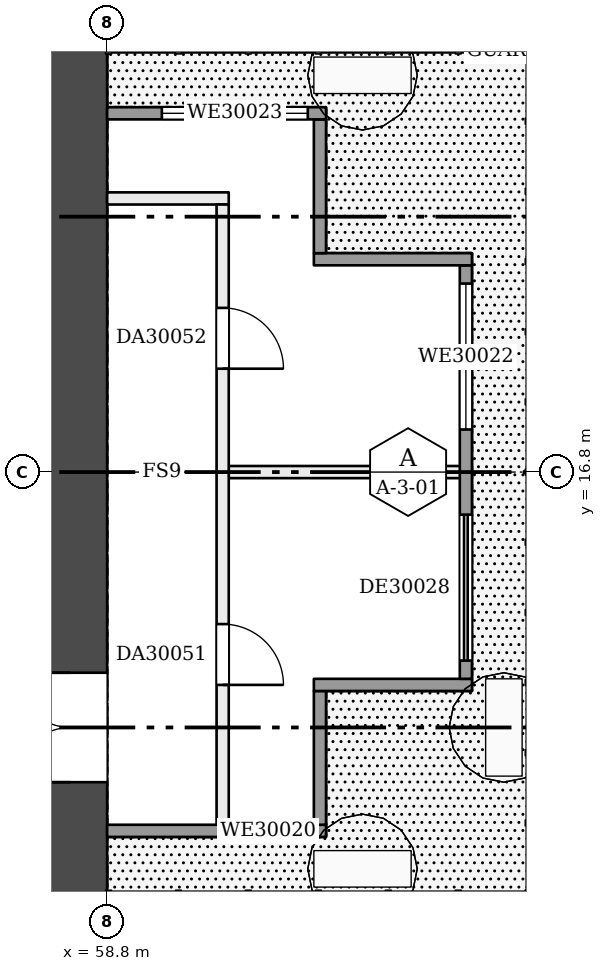
"""IFC4 building model, lengths in metres.
Left out: names, types, materials, properties, quantities, classifications, styles, units other than length and angle.
Written with IfcOpenShell. Run it as: python <this file> out.ifc"""

import sys

from ifc_helpers import new_model, si_unit, direction, frame, frame_2d, origin, place, context, subcontext, project, spatial, rectangle, extrude, element, fill, save


model = new_model("IFC4")
c1 = context("Model", 3, precision=1e-05, world=origin(), true_north=direction((0.0, 1.0)))
c2 = subcontext(c1, "Body", "Model", "MODEL_VIEW")
j1 = project(units=[si_unit("LENGTHUNIT", "METRE"), si_unit("PLANEANGLEUNIT", "RADIAN")], contexts=[c1])
p1 = place(None, origin())
s1 = spatial("IfcSite", under=j1, at=p1, CompositionType="ELEMENT")
p2 = place(p1, origin())
s2 = spatial("IfcBuilding", under=s1, at=p2, CompositionType="ELEMENT")
p3 = place(p2, frame((0.0, 0.0, 119.7)))
s3 = spatial("IfcBuildingStorey", under=s2, at=p3, CompositionType="ELEMENT", Elevation=119.7)
p4 = place(p3, frame((58.2, 9.6, 0.0), z_axis=(0.0, 0.0, 1.0), x_axis=(0.0, 1.0, 0.0)))
e1 = element("IfcWall", 1, at=p4, inside=s3, PredefinedType="SHEAR", context=c2, shape_type="SweptSolid", body=[
    extrude(rectangle(XDim=14.4, YDim=1.2, at=frame_2d((7.2, 0.0))), origin(), (0.0, 0.0, 1.0), 3.22),
])
p5 = place(p4, frame((2.1, 0.0, 0.0)))
e2 = element("IfcOpeningElement", 2, at=p5, cuts=e1, PredefinedType="OPENING", context=c2, shape_type="SweptSolid", body=[
    extrude(rectangle(XDim=1.8, YDim=2.1, at=frame_2d((0.9, 1.05))), frame((0.0, 0.61, 0.0), z_axis=(0.0, -1.0, 0.0), x_axis=(1.0, 0.0, 0.0)), (0.0, 0.0, 1.0), 1.22),
])
p6 = place(p3, frame((60.8, 16.8, 0.0), z_axis=(0.0, 0.0, 1.0), x_axis=(1.0, 0.0, 0.0)))
e3 = element("IfcWall", 3, at=p6, inside=s3, PredefinedType="PARTITIONING", context=c2, shape_type="SweptSolid", body=[
    extrude(rectangle(XDim=3.9, YDim=0.2, at=frame_2d((1.95, 0.0))), origin(), (0.0, 0.0, 1.0), 3.22),
])
p7 = place(p3, frame((58.8, 21.3, 0.0), z_axis=(0.0, 0.0, 1.0), x_axis=(1.0, 0.0, 0.0)))
e4 = element("IfcWall", 4, at=p7, inside=s3, PredefinedType="PARTITIONING", context=c2, shape_type="SweptSolid", body=[
    extrude(rectangle(XDim=2.0, YDim=0.2, at=frame_2d((1.0, 0.0))), origin(), (0.0, 0.0, 1.0), 3.22),
])
p8 = place(p3, frame((60.7, 10.9, 0.0), z_axis=(0.0, 0.0, 1.0), x_axis=(0.0, 1.0, 0.0)))
e5 = element("IfcWall", 5, at=p8, inside=s3, PredefinedType="PARTITIONING", context=c2, shape_type="SweptSolid", body=[
    extrude(rectangle(XDim=10.3, YDim=0.2, at=frame_2d((5.15, 0.0))), origin(), (0.0, 0.0, 1.0), 3.22),
])
p9 = place(p8, frame((2.4, 0.0, 0.0)))
e6 = element("IfcOpeningElement", 6, at=p9, cuts=e5, PredefinedType="OPENING", context=c2, shape_type="SweptSolid", body=[
    extrude(rectangle(XDim=1.0, YDim=2.1, at=frame_2d((0.5, 1.05))), frame((0.0, 0.11, 0.0), z_axis=(0.0, -1.0, 0.0), x_axis=(1.0, 0.0, 0.0)), (0.0, 0.0, 1.0), 0.22),
])
p10 = place(p8, frame((7.6, 0.0, 0.0)))
e7 = element("IfcOpeningElement", 7, at=p10, cuts=e5, PredefinedType="OPENING", context=c2, shape_type="SweptSolid", body=[
    extrude(rectangle(XDim=1.0, YDim=2.1, at=frame_2d((0.5, 1.05))), frame((0.0, 0.11, 0.0), z_axis=(0.0, -1.0, 0.0), x_axis=(1.0, 0.0, 0.0)), (0.0, 0.0, 1.0), 0.22),
])
p11 = place(p3, frame((58.8, 10.9, 0.0), z_axis=(0.0, 0.0, 1.0), x_axis=(1.0, 0.0, 0.0)))
e8 = element("IfcWall", 8, at=p11, inside=s3, PredefinedType="SOLIDWALL", context=c2, shape_type="SweptSolid", body=[
    extrude(rectangle(XDim=3.6, YDim=0.2, at=frame_2d((1.8, 0.0))), origin(), (0.0, 0.0, 1.0), 3.22),
])
p12 = place(p11, frame((2.0, 0.0, 0.9)))
e9 = element("IfcOpeningElement", 9, at=p12, cuts=e8, PredefinedType="OPENING", context=c2, shape_type="SweptSolid", body=[
    extrude(rectangle(XDim=1.3, YDim=1.5, at=frame_2d((0.65, 0.75))), frame((0.0, 0.11, 0.0), z_axis=(0.0, -1.0, 0.0), x_axis=(1.0, 0.0, 0.0)), (0.0, 0.0, 1.0), 0.22),
])
p13 = place(p3, frame((62.3, 11.0, 0.0), z_axis=(0.0, 0.0, 1.0), x_axis=(0.0, 1.0, 0.0)))
e10 = element("IfcWall", 10, at=p13, inside=s3, PredefinedType="SOLIDWALL", context=c2, shape_type="SweptSolid", body=[
    extrude(rectangle(XDim=2.2, YDim=0.2, at=frame_2d((1.1, 0.0))), origin(), (0.0, 0.0, 1.0), 3.22),
])
p14 = place(p3, frame((62.2, 13.3, 0.0), z_axis=(0.0, 0.0, 1.0), x_axis=(1.0, 0.0, 0.0)))
e11 = element("IfcWall", 11, at=p14, inside=s3, PredefinedType="SOLIDWALL", context=c2, shape_type="SweptSolid", body=[
    extrude(rectangle(XDim=2.6, YDim=0.2, at=frame_2d((1.3, 0.0))), origin(), (0.0, 0.0, 1.0), 3.22),
])
p15 = place(p3, frame((64.7, 13.4, 0.0), z_axis=(0.0, 0.0, 1.0), x_axis=(0.0, 1.0, 0.0)))
e12 = element("IfcWall", 12, at=p15, inside=s3, PredefinedType="SOLIDWALL", context=c2, shape_type="SweptSolid", body=[
    extrude(rectangle(XDim=6.8, YDim=0.2, at=frame_2d((3.4, 0.0))), origin(), (0.0, 0.0, 1.0), 3.22),
])
p16 = place(p15, frame((4.1, 0.0, 0.9)))
e13 = element("IfcOpeningElement", 13, at=p16, cuts=e12, PredefinedType="OPENING", context=c2, shape_type="SweptSolid", body=[
    extrude(rectangle(XDim=2.4, YDim=1.5, at=frame_2d((1.2, 0.75))), frame((0.0, 0.11, 0.0), z_axis=(0.0, -1.0, 0.0), x_axis=(1.0, 0.0, 0.0)), (0.0, 0.0, 1.0), 0.22),
])
p17 = place(p15, frame((0.3, 0.0, 0.0)))
e14 = element("IfcOpeningElement", 14, at=p17, cuts=e12, PredefinedType="OPENING", context=c2, shape_type="SweptSolid", body=[
    extrude(rectangle(XDim=2.4, YDim=2.2, at=frame_2d((1.2, 1.1))), frame((0.0, 0.11, 0.0), z_axis=(0.0, -1.0, 0.0), x_axis=(1.0, 0.0, 0.0)), (0.0, 0.0, 1.0), 0.22),
])
p18 = place(p3, frame((64.8, 20.3, 0.0), z_axis=(0.0, 0.0, 1.0), x_axis=(-1.0, 0.0, 0.0)))
e15 = element("IfcWall", 15, at=p18, inside=s3, PredefinedType="SOLIDWALL", context=c2, shape_type="SweptSolid", body=[
    extrude(rectangle(XDim=2.6, YDim=0.2, at=frame_2d((1.3, 0.0))), origin(), (0.0, 0.0, 1.0), 3.22),
])
p19 = place(p3, frame((62.3, 20.4, 0.0), z_axis=(0.0, 0.0, 1.0), x_axis=(0.0, 1.0, 0.0)))
e16 = element("IfcWall", 16, at=p19, inside=s3, PredefinedType="SOLIDWALL", context=c2, shape_type="SweptSolid", body=[
    extrude(rectangle(XDim=2.2, YDim=0.2, at=frame_2d((1.1, 0.0))), origin(), (0.0, 0.0, 1.0), 3.22),
])
p20 = place(p3, frame((62.4, 22.7, 0.0), z_axis=(0.0, 0.0, 1.0), x_axis=(-1.0, 0.0, 0.0)))
e17 = element("IfcWall", 17, at=p20, inside=s3, PredefinedType="SOLIDWALL", context=c2, shape_type="SweptSolid", body=[
    extrude(rectangle(XDim=3.6, YDim=0.2, at=frame_2d((1.8, 0.0))), origin(), (0.0, 0.0, 1.0), 3.22),
])
p21 = place(p20, frame((0.3, 0.0, 0.9)))
e18 = element("IfcOpeningElement", 18, at=p21, cuts=e17, PredefinedType="OPENING", context=c2, shape_type="SweptSolid", body=[
    extrude(rectangle(XDim=2.4, YDim=1.5, at=frame_2d((1.2, 0.75))), frame((0.0, 0.11, 0.0), z_axis=(0.0, -1.0, 0.0), x_axis=(1.0, 0.0, 0.0)), (0.0, 0.0, 1.0), 0.22),
])
p22 = place(p5, origin())
e19 = element("IfcDoor", 19, at=p22, inside=s3, OperationType="DOUBLE_DOOR_SINGLE_SWING", PredefinedType="DOOR", context=c2, shape_type="SweptSolid", body=[
    extrude(rectangle(XDim=1.8, YDim=2.1, at=frame_2d((0.9, 1.05))), frame((0.0, 0.025, 0.0), z_axis=(0.0, -1.0, 0.0), x_axis=(1.0, 0.0, 0.0)), (0.0, 0.0, 1.0), 0.05),
])
fill(e2, e19)
p23 = place(p9, frame((1.0, 0.0, 0.0), z_axis=(0.0, 0.0, 1.0), x_axis=(-1.0, 0.0, 0.0)))
e20 = element("IfcDoor", 20, at=p23, inside=s3, OperationType="SINGLE_SWING_RIGHT", PredefinedType="DOOR", context=c2, shape_type="SweptSolid", body=[
    extrude(rectangle(XDim=1.0, YDim=2.1, at=frame_2d((0.5, 1.05))), frame((0.0, 0.025, 0.0), z_axis=(0.0, -1.0, 0.0), x_axis=(1.0, 0.0, 0.0)), (0.0, 0.0, 1.0), 0.05),
])
fill(e6, e20)
p24 = place(p10, frame((1.0, 0.0, 0.0), z_axis=(0.0, 0.0, 1.0), x_axis=(-1.0, 0.0, 0.0)))
e21 = element("IfcDoor", 21, at=p24, inside=s3, OperationType="SINGLE_SWING_RIGHT", PredefinedType="DOOR", context=c2, shape_type="SweptSolid", body=[
    extrude(rectangle(XDim=1.0, YDim=2.1, at=frame_2d((0.5, 1.05))), frame((0.0, 0.025, 0.0), z_axis=(0.0, -1.0, 0.0), x_axis=(1.0, 0.0, 0.0)), (0.0, 0.0, 1.0), 0.05),
])
fill(e7, e21)
p25 = place(p12, origin())
e22 = element("IfcWindow", 22, at=p25, inside=s3, PartitioningType="SINGLE_PANEL", PredefinedType="WINDOW", context=c2, shape_type="SweptSolid", body=[
    extrude(rectangle(XDim=1.3, YDim=1.5, at=frame_2d((0.65, 0.75))), frame((0.0, 0.03, 0.0), z_axis=(0.0, -1.0, 0.0), x_axis=(1.0, 0.0, 0.0)), (0.0, 0.0, 1.0), 0.06),
])
fill(e9, e22)
p26 = place(p16, origin())
e23 = element("IfcWindow", 23, at=p26, inside=s3, PartitioningType="SINGLE_PANEL", PredefinedType="WINDOW", context=c2, shape_type="SweptSolid", body=[
    extrude(rectangle(XDim=2.4, YDim=1.5, at=frame_2d((1.2, 0.75))), frame((0.0, 0.03, 0.0), z_axis=(0.0, -1.0, 0.0), x_axis=(1.0, 0.0, 0.0)), (0.0, 0.0, 1.0), 0.06),
])
fill(e13, e23)
p27 = place(p21, origin())
e24 = element("IfcWindow", 24, at=p27, inside=s3, PartitioningType="SINGLE_PANEL", PredefinedType="WINDOW", context=c2, shape_type="SweptSolid", body=[
    extrude(rectangle(XDim=2.4, YDim=1.5, at=frame_2d((1.2, 0.75))), frame((0.0, 0.03, 0.0), z_axis=(0.0, -1.0, 0.0), x_axis=(1.0, 0.0, 0.0)), (0.0, 0.0, 1.0), 0.06),
])
fill(e18, e24)
p28 = place(p17, origin())
e25 = element("IfcDoor", 25, at=p28, inside=s3, OperationType="DOUBLE_DOOR_SLIDING", PredefinedType="DOOR", context=c2, shape_type="SweptSolid", body=[
    extrude(rectangle(XDim=2.4, YDim=2.2, at=frame_2d((1.2, 1.1))), frame((0.0, 0.025, 0.0), z_axis=(0.0, -1.0, 0.0), x_axis=(1.0, 0.0, 0.0)), (0.0, 0.0, 1.0), 0.05),
])
fill(e14, e25)
save(model, sys.argv[1])
